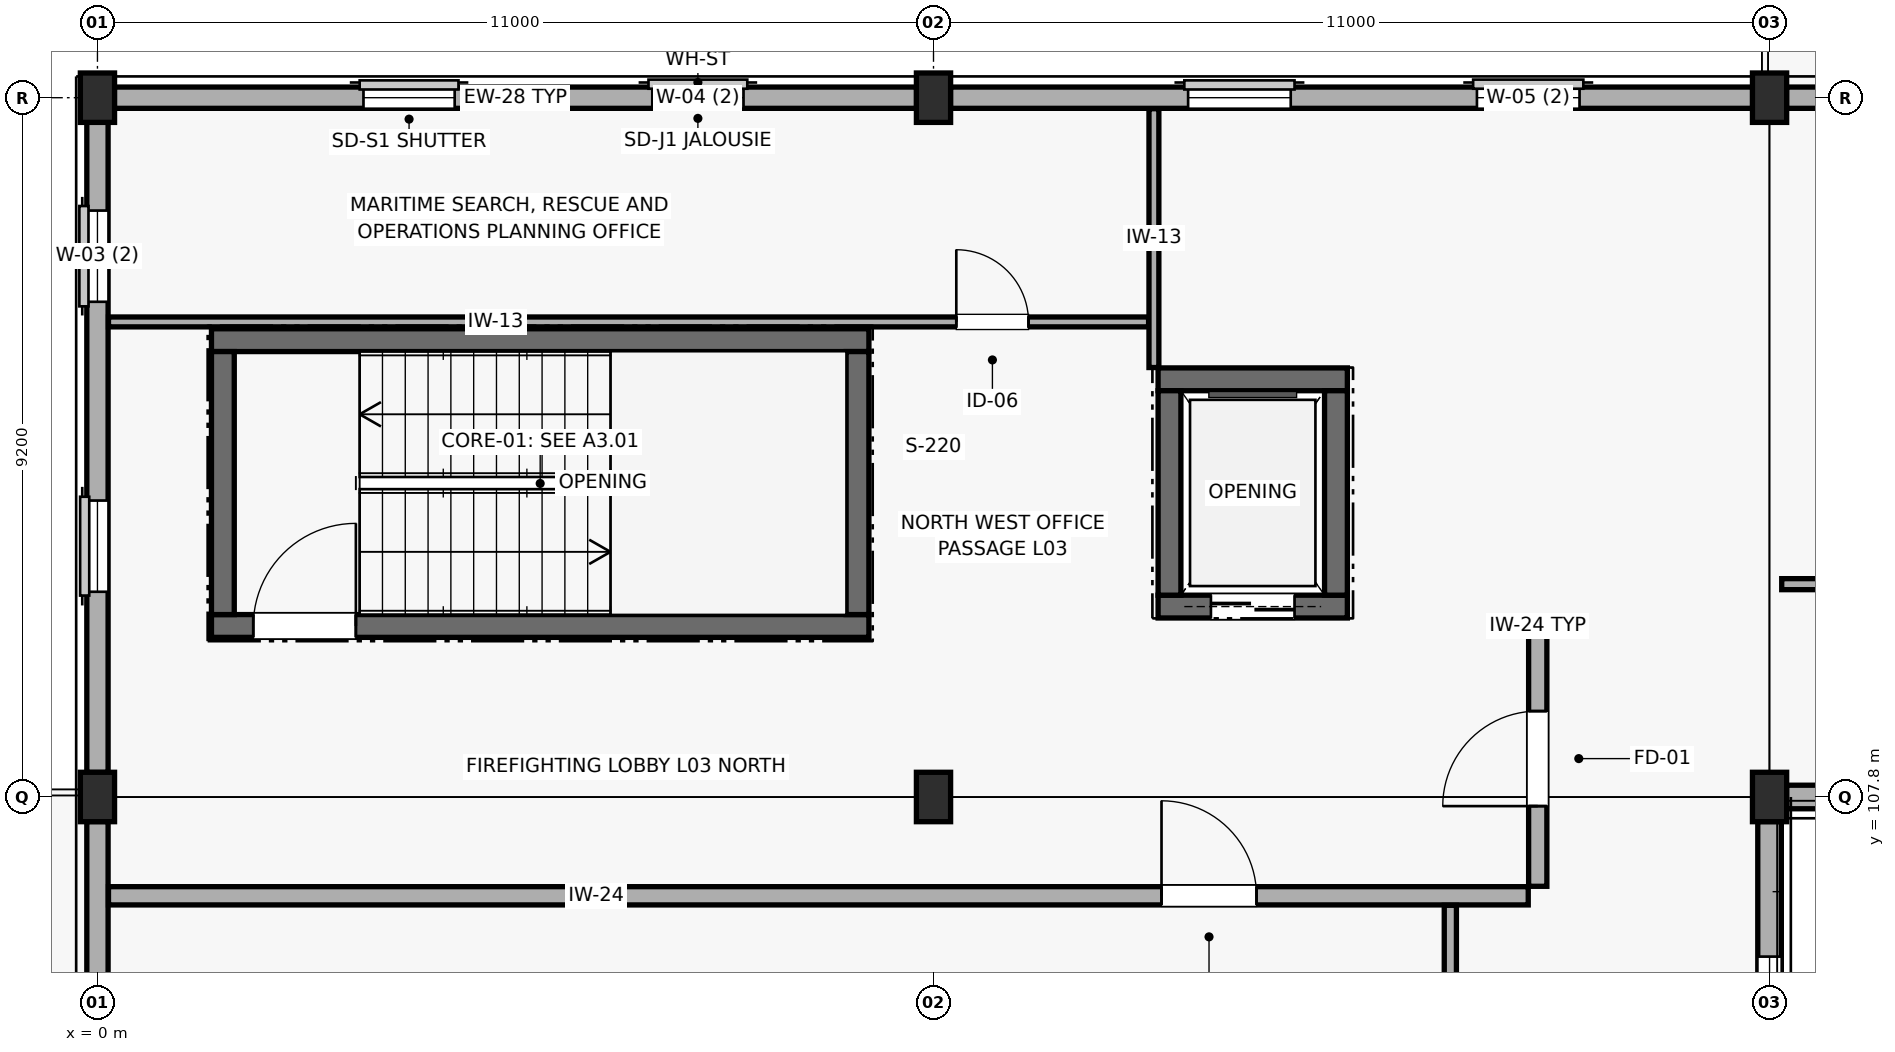
"""IFC4 building model, lengths in metres.
Left out: names, types, materials, properties, quantities, classifications, styles, units other than length and angle.
Written with IfcOpenShell. Run it as: python <this file> out.ifc"""

import sys

from ifc_helpers import new_model, si_unit, direction, frame, frame_2d, origin, origin_2d, place, context, subcontext, project, spatial, rectangle, extrude, element, fill, save


model = new_model("IFC4")
c1 = context("Model", 3, precision=1e-05, world=origin(), true_north=direction((0.0, 1.0)))
c2 = subcontext(c1, "Body", "Model", "MODEL_VIEW")
j1 = project(units=[si_unit("LENGTHUNIT", "METRE"), si_unit("PLANEANGLEUNIT", "RADIAN")], contexts=[c1])
p1 = place(None, origin())
s1 = spatial("IfcSite", under=j1, at=p1, CompositionType="ELEMENT")
p2 = place(p1, origin())
s2 = spatial("IfcBuilding", under=s1, at=p2, CompositionType="ELEMENT")
p3 = place(p2, frame((0.0, 0.0, 14.1)))
s3 = spatial("IfcBuildingStorey", under=s2, at=p3, CompositionType="ELEMENT", Elevation=14.1)
for number, where, z_axis, x_axis in (
    (1, (0.0, 107.8, 0.0), (0.0, 0.0, 1.0), (1.0, 0.0, 0.0)),
    (2, (0.0, 117.0, 0.0), (0.0, 0.0, 1.0), (1.0, 0.0, 0.0)),
    (3, (11.0, 107.8, 0.0), (0.0, 0.0, 1.0), (1.0, 0.0, 0.0)),
    (4, (11.0, 117.0, 0.0), (0.0, 0.0, 1.0), (1.0, 0.0, 0.0)),
    (5, (22.0, 107.8, 0.0), (0.0, 0.0, 1.0), (1.0, 0.0, 0.0)),
    (6, (22.0, 117.0, 0.0), (0.0, 0.0, 1.0), (1.0, 0.0, 0.0)),
):
    element("IfcColumn", number, at=place(p3, frame(where, z_axis=z_axis, x_axis=x_axis)), inside=s3, PredefinedType="COLUMN", context=c2, shape_type="SweptSolid", body=[
        extrude(rectangle(XDim=0.45, YDim=0.65, at=origin_2d()), origin(), (0.0, 0.0, 1.0), 4.2),
    ])
p4 = place(p3, frame((10.777, 117.0, 0.0), z_axis=(0.0, 0.0, 1.0), x_axis=(-1.0, 0.0, 0.0)))
e7 = element("IfcWall", 7, at=p4, inside=s3, PredefinedType="SOLIDWALL", context=c2, shape_type="SweptSolid", body=[
    extrude(rectangle(XDim=10.554, YDim=0.28, at=frame_2d((5.277, 0.0))), origin(), (0.0, 0.0, 1.0), 3.437),
])
p5 = place(p4, frame((2.277, 0.0, 0.95)))
e8 = element("IfcOpeningElement", 8, at=p5, cuts=e7, PredefinedType="OPENING", context=c2, shape_type="SweptSolid", body=[
    extrude(rectangle(XDim=1.2, YDim=2.1, at=frame_2d((0.6, 1.05))), frame((0.0, 0.15, 0.0), z_axis=(0.0, -1.0, 0.0), x_axis=(1.0, 0.0, 0.0)), (0.0, 0.0, 1.0), 0.3),
])
p6 = place(p4, frame((6.077, 0.0, 0.95)))
e9 = element("IfcOpeningElement", 9, at=p6, cuts=e7, PredefinedType="OPENING", context=c2, shape_type="SweptSolid", body=[
    extrude(rectangle(XDim=1.2, YDim=2.1, at=frame_2d((0.6, 1.05))), frame((0.0, 0.15, 0.0), z_axis=(0.0, -1.0, 0.0), x_axis=(1.0, 0.0, 0.0)), (0.0, 0.0, 1.0), 0.3),
])
p7 = place(p3, frame((21.777, 117.0, 0.0), z_axis=(0.0, 0.0, 1.0), x_axis=(-1.0, 0.0, 0.0)))
e10 = element("IfcWall", 10, at=p7, inside=s3, PredefinedType="SOLIDWALL", context=c2, shape_type="SweptSolid", body=[
    extrude(rectangle(XDim=10.554, YDim=0.28, at=frame_2d((5.277, 0.0))), origin(), (0.0, 0.0, 1.0), 3.437),
])
p8 = place(p7, frame((2.277, 0.0, 0.95)))
e11 = element("IfcOpeningElement", 11, at=p8, cuts=e10, PredefinedType="OPENING", context=c2, shape_type="SweptSolid", body=[
    extrude(rectangle(XDim=1.35, YDim=2.1, at=frame_2d((0.675, 1.05))), frame((0.0, 0.15, 0.0), z_axis=(0.0, -1.0, 0.0), x_axis=(1.0, 0.0, 0.0)), (0.0, 0.0, 1.0), 0.3),
])
p9 = place(p7, frame((6.077, 0.0, 0.95)))
e12 = element("IfcOpeningElement", 12, at=p9, cuts=e10, PredefinedType="OPENING", context=c2, shape_type="SweptSolid", body=[
    extrude(rectangle(XDim=1.35, YDim=2.1, at=frame_2d((0.675, 1.05))), frame((0.0, 0.15, 0.0), z_axis=(0.0, -1.0, 0.0), x_axis=(1.0, 0.0, 0.0)), (0.0, 0.0, 1.0), 0.3),
])
p10 = place(p3, frame((32.777, 117.0, 0.0), z_axis=(0.0, 0.0, 1.0), x_axis=(-1.0, 0.0, 0.0)))
e13 = element("IfcWall", 13, at=p10, inside=s3, PredefinedType="SOLIDWALL", context=c2, shape_type="SweptSolid", body=[
    extrude(rectangle(XDim=10.554, YDim=0.28, at=frame_2d((5.277, 0.0))), origin(), (0.0, 0.0, 1.0), 3.446),
])
p11 = place(p10, frame((4.877, 0.0, 0.0)))
e14 = element("IfcOpeningElement", 14, at=p11, cuts=e13, PredefinedType="OPENING", context=c2, shape_type="SweptSolid", body=[
    extrude(rectangle(XDim=1.2, YDim=2.2, at=frame_2d((0.6, 1.1))), frame((0.0, 0.15, 0.0), z_axis=(0.0, -1.0, 0.0), x_axis=(1.0, 0.0, 0.0)), (0.0, 0.0, 1.0), 0.3),
])
p12 = place(p3, frame((0.0, 107.477, 0.0), z_axis=(0.0, 0.0, 1.0), x_axis=(0.0, -1.0, 0.0)))
e15 = element("IfcWall", 15, at=p12, inside=s3, PredefinedType="SOLIDWALL", context=c2, shape_type="SweptSolid", body=[
    extrude(rectangle(XDim=8.554, YDim=0.28, at=frame_2d((4.277, 0.0))), origin(), (0.0, 0.0, 1.0), 3.439),
])
p13 = place(p12, frame((2.977, 0.0, 0.0)))
e16 = element("IfcOpeningElement", 16, at=p13, cuts=e15, PredefinedType="OPENING", context=c2, shape_type="SweptSolid", body=[
    extrude(rectangle(XDim=1.2, YDim=2.2, at=frame_2d((0.6, 1.1))), frame((0.0, 0.15, 0.0), z_axis=(0.0, -1.0, 0.0), x_axis=(1.0, 0.0, 0.0)), (0.0, 0.0, 1.0), 0.3),
])
p14 = place(p3, frame((0.0, 116.677, 0.0), z_axis=(0.0, 0.0, 1.0), x_axis=(0.0, -1.0, 0.0)))
e17 = element("IfcWall", 17, at=p14, inside=s3, PredefinedType="SOLIDWALL", context=c2, shape_type="SweptSolid", body=[
    extrude(rectangle(XDim=8.554, YDim=0.28, at=frame_2d((4.277, 0.0))), origin(), (0.0, 0.0, 1.0), 3.439),
])
p15 = place(p14, frame((1.162, 0.0, 0.95)))
e18 = element("IfcOpeningElement", 18, at=p15, cuts=e17, PredefinedType="OPENING", context=c2, shape_type="SweptSolid", body=[
    extrude(rectangle(XDim=1.2, YDim=1.8, at=frame_2d((0.6, 0.9))), frame((0.0, 0.15, 0.0), z_axis=(0.0, -1.0, 0.0), x_axis=(1.0, 0.0, 0.0)), (0.0, 0.0, 1.0), 0.3),
])
p16 = place(p14, frame((4.977, 0.0, 0.95)))
e19 = element("IfcOpeningElement", 19, at=p16, cuts=e17, PredefinedType="OPENING", context=c2, shape_type="SweptSolid", body=[
    extrude(rectangle(XDim=1.2, YDim=1.8, at=frame_2d((0.6, 0.9))), frame((0.0, 0.15, 0.0), z_axis=(0.0, -1.0, 0.0), x_axis=(1.0, 0.0, 0.0)), (0.0, 0.0, 1.0), 0.3),
])
p17 = place(p3, frame((22.223, 107.8, 0.0), z_axis=(0.0, 0.0, 1.0), x_axis=(1.0, 0.0, 0.0)))
e20 = element("IfcWall", 20, at=p17, inside=s3, PredefinedType="SOLIDWALL", context=c2, shape_type="SweptSolid", body=[
    extrude(rectangle(XDim=10.554, YDim=0.31, at=frame_2d((5.277, 0.0))), origin(), (0.0, 0.0, 1.0), 3.446),
])
p18 = place(p17, frame((2.477, 0.0, 0.95)))
e21 = element("IfcOpeningElement", 21, at=p18, cuts=e20, PredefinedType="OPENING", context=c2, shape_type="SweptSolid", body=[
    extrude(rectangle(XDim=1.65, YDim=2.25, at=frame_2d((0.825, 1.125))), frame((0.0, 0.165, 0.0), z_axis=(0.0, -1.0, 0.0), x_axis=(1.0, 0.0, 0.0)), (0.0, 0.0, 1.0), 0.33),
])
p19 = place(p17, frame((6.077, 0.0, 0.95)))
e22 = element("IfcOpeningElement", 22, at=p19, cuts=e20, PredefinedType="OPENING", context=c2, shape_type="SweptSolid", body=[
    extrude(rectangle(XDim=1.65, YDim=2.25, at=frame_2d((0.825, 1.125))), frame((0.0, 0.165, 0.0), z_axis=(0.0, -1.0, 0.0), x_axis=(1.0, 0.0, 0.0)), (0.0, 0.0, 1.0), 0.33),
])
p20 = place(p3, frame((22.0, 98.923, 0.0), z_axis=(0.0, 0.0, 1.0), x_axis=(0.0, 1.0, 0.0)))
e23 = element("IfcWall", 23, at=p20, inside=s3, PredefinedType="SOLIDWALL", context=c2, shape_type="SweptSolid", body=[
    extrude(rectangle(XDim=8.554, YDim=0.31, at=frame_2d((4.277, 0.0))), origin(), (0.0, 0.0, 1.0), 3.439),
])
p21 = place(p20, frame((2.177, 0.0, 0.95)))
e24 = element("IfcOpeningElement", 24, at=p21, cuts=e23, PredefinedType="OPENING", context=c2, shape_type="SweptSolid", body=[
    extrude(rectangle(XDim=1.5, YDim=2.25, at=frame_2d((0.75, 1.125))), frame((0.0, 0.165, 0.0), z_axis=(0.0, -1.0, 0.0), x_axis=(1.0, 0.0, 0.0)), (0.0, 0.0, 1.0), 0.33),
])
p22 = place(p20, frame((5.277, 0.0, 0.95)))
e25 = element("IfcOpeningElement", 25, at=p22, cuts=e23, PredefinedType="OPENING", context=c2, shape_type="SweptSolid", body=[
    extrude(rectangle(XDim=1.5, YDim=2.25, at=frame_2d((0.75, 1.125))), frame((0.0, 0.165, 0.0), z_axis=(0.0, -1.0, 0.0), x_axis=(1.0, 0.0, 0.0)), (0.0, 0.0, 1.0), 0.33),
])
p23 = place(p3, frame((1.5, 110.05, 0.0), z_axis=(0.0, 0.0, 1.0), x_axis=(1.0, 0.0, 0.0)))
e26 = element("IfcWall", 26, at=p23, inside=s3, PredefinedType="SHEAR", context=c2, shape_type="SweptSolid", body=[
    extrude(rectangle(XDim=8.65, YDim=0.3, at=frame_2d((4.325, 0.0))), origin(), (0.0, 0.0, 1.0), 3.98),
])
p24 = place(p23, frame((0.55, 0.0, 0.0)))
e27 = element("IfcOpeningElement", 27, at=p24, cuts=e26, PredefinedType="OPENING", context=c2, shape_type="SweptSolid", body=[
    extrude(rectangle(XDim=1.35, YDim=2.2, at=frame_2d((0.675, 1.1))), frame((0.0, 0.16, 0.0), z_axis=(0.0, -1.0, 0.0), x_axis=(1.0, 0.0, 0.0)), (0.0, 0.0, 1.0), 0.32),
])
p25 = place(p3, frame((10.15, 113.81, 0.0), z_axis=(0.0, 0.0, 1.0), x_axis=(-1.0, 0.0, 0.0)))
e28 = element("IfcWall", 28, at=p25, inside=s3, PredefinedType="SHEAR", context=c2, shape_type="SweptSolid", body=[
    extrude(rectangle(XDim=8.65, YDim=0.3, at=frame_2d((4.325, 0.0))), origin(), (0.0, 0.0, 1.0), 3.98),
])
for number, where, z_axis, x_axis in (
    (29, (1.65, 113.66, 0.0), (0.0, 0.0, 1.0), (0.0, -1.0, 0.0)),
    (30, (10.0, 110.2, 0.0), (0.0, 0.0, 1.0), (0.0, 1.0, 0.0)),
):
    element("IfcWall", number, at=place(p3, frame(where, z_axis=z_axis, x_axis=x_axis)), inside=s3, PredefinedType="SHEAR", context=c2, shape_type="SweptSolid", body=[
        extrude(rectangle(XDim=3.46, YDim=0.3, at=frame_2d((1.73, 0.0))), origin(), (0.0, 0.0, 1.0), 3.98),
    ])
p26 = place(p3, frame((13.955, 110.305, 0.0), z_axis=(0.0, 0.0, 1.0), x_axis=(1.0, 0.0, 0.0)))
e31 = element("IfcWall", 31, at=p26, inside=s3, PredefinedType="SHEAR", context=c2, shape_type="SweptSolid", body=[
    extrude(rectangle(XDim=2.49, YDim=0.3, at=frame_2d((1.245, 0.0))), origin(), (0.0, 0.0, 1.0), 3.98),
])
p27 = place(p26, frame((0.695, 0.0, 0.0)))
e32 = element("IfcOpeningElement", 32, at=p27, cuts=e31, PredefinedType="OPENING", context=c2, shape_type="SweptSolid", body=[
    extrude(rectangle(XDim=1.1, YDim=2.15, at=frame_2d((0.55, 1.075))), frame((0.0, 0.16, 0.0), z_axis=(0.0, -1.0, 0.0), x_axis=(1.0, 0.0, 0.0)), (0.0, 0.0, 1.0), 0.32),
])
p28 = place(p3, frame((16.445, 113.295, 0.0), z_axis=(0.0, 0.0, 1.0), x_axis=(-1.0, 0.0, 0.0)))
e33 = element("IfcWall", 33, at=p28, inside=s3, PredefinedType="SHEAR", context=c2, shape_type="SweptSolid", body=[
    extrude(rectangle(XDim=2.49, YDim=0.3, at=frame_2d((1.245, 0.0))), origin(), (0.0, 0.0, 1.0), 3.98),
])
for number, where, z_axis, x_axis in (
    (34, (14.105, 113.145, 0.0), (0.0, 0.0, 1.0), (0.0, -1.0, 0.0)),
    (35, (16.295, 110.455, 0.0), (0.0, 0.0, 1.0), (0.0, 1.0, 0.0)),
):
    element("IfcWall", number, at=place(p3, frame(where, z_axis=z_axis, x_axis=x_axis)), inside=s3, PredefinedType="SHEAR", context=c2, shape_type="SweptSolid", body=[
        extrude(rectangle(XDim=2.69, YDim=0.3, at=frame_2d((1.345, 0.0))), origin(), (0.0, 0.0, 1.0), 3.98),
    ])
p29 = place(p3, frame((0.145, 106.5, 0.0), z_axis=(0.0, 0.0, 1.0), x_axis=(1.0, 0.0, 0.0)))
e36 = element("IfcWall", 36, at=p29, inside=s3, PredefinedType="PARTITIONING", context=c2, shape_type="SweptSolid", body=[
    extrude(rectangle(XDim=18.68, YDim=0.24, at=frame_2d((9.34, 0.0))), origin(), (0.0, 0.0, 1.0), 3.439),
])
p30 = place(p29, frame((13.855, 0.0, 0.0)))
e37 = element("IfcOpeningElement", 37, at=p30, cuts=e36, PredefinedType="OPENING", context=c2, shape_type="SweptSolid", body=[
    extrude(rectangle(XDim=1.25, YDim=2.2, at=frame_2d((0.625, 1.1))), frame((0.0, 0.13, 0.0), z_axis=(0.0, -1.0, 0.0), x_axis=(1.0, 0.0, 0.0)), (0.0, 0.0, 1.0), 0.26),
])
p31 = place(p3, frame((17.8, 80.625, 0.0), z_axis=(0.0, 0.0, 1.0), x_axis=(0.0, 1.0, 0.0)))
e38 = element("IfcWall", 38, at=p31, inside=s3, PredefinedType="PARTITIONING", context=c2, shape_type="SweptSolid", body=[
    extrude(rectangle(XDim=25.75, YDim=0.16, at=frame_2d((12.875, 0.0))), origin(), (0.0, 0.0, 1.0), 3.437),
])
p32 = place(p31, frame((5.205, 0.0, 0.0)))
e39 = element("IfcOpeningElement", 39, at=p32, cuts=e38, PredefinedType="OPENING", context=c2, shape_type="SweptSolid", body=[
    extrude(rectangle(XDim=1.05, YDim=2.2, at=frame_2d((0.525, 1.1))), frame((0.0, 0.09, 0.0), z_axis=(0.0, -1.0, 0.0), x_axis=(1.0, 0.0, 0.0)), (0.0, 0.0, 1.0), 0.18),
])
p33 = place(p31, frame((18.205, 0.0, 0.0)))
e40 = element("IfcOpeningElement", 40, at=p33, cuts=e38, PredefinedType="OPENING", context=c2, shape_type="SweptSolid", body=[
    extrude(rectangle(XDim=1.05, YDim=2.2, at=frame_2d((0.525, 1.1))), frame((0.0, 0.09, 0.0), z_axis=(0.0, -1.0, 0.0), x_axis=(1.0, 0.0, 0.0)), (0.0, 0.0, 1.0), 0.18),
])
p34 = place(p3, frame((18.95, 106.625, 0.0), z_axis=(0.0, 0.0, 1.0), x_axis=(0.0, 1.0, 0.0)))
e41 = element("IfcWall", 41, at=p34, inside=s3, PredefinedType="PARTITIONING", context=c2, shape_type="SweptSolid", body=[
    extrude(rectangle(XDim=3.525, YDim=0.24, at=frame_2d((1.762, 0.0))), origin(), (0.0, 0.0, 1.0), 3.437),
])
p35 = place(p34, frame((1.055, 0.0, 0.0)))
e42 = element("IfcOpeningElement", 42, at=p35, cuts=e41, PredefinedType="OPENING", context=c2, shape_type="SweptSolid", body=[
    extrude(rectangle(XDim=1.25, YDim=2.2, at=frame_2d((0.625, 1.1))), frame((0.0, 0.13, 0.0), z_axis=(0.0, -1.0, 0.0), x_axis=(1.0, 0.0, 0.0)), (0.0, 0.0, 1.0), 0.26),
])
p36 = place(p3, frame((0.145, 114.05, 0.0), z_axis=(0.0, 0.0, 1.0), x_axis=(1.0, 0.0, 0.0)))
e43 = element("IfcWall", 43, at=p36, inside=s3, PredefinedType="PARTITIONING", context=c2, shape_type="SweptSolid", body=[
    extrude(rectangle(XDim=13.685, YDim=0.13, at=frame_2d((6.843, 0.0))), origin(), (0.0, 0.0, 1.0), 3.439),
])
p37 = place(p36, frame((11.155, 0.0, 0.0)))
e44 = element("IfcOpeningElement", 44, at=p37, cuts=e43, PredefinedType="OPENING", context=c2, shape_type="SweptSolid", body=[
    extrude(rectangle(XDim=0.95, YDim=2.15, at=frame_2d((0.475, 1.075))), frame((0.0, 0.075, 0.0), z_axis=(0.0, -1.0, 0.0), x_axis=(1.0, 0.0, 0.0)), (0.0, 0.0, 1.0), 0.15),
])
p38 = place(p3, frame((13.9, 113.45, 0.0), z_axis=(0.0, 0.0, 1.0), x_axis=(0.0, 1.0, 0.0)))
e45 = element("IfcWall", 45, at=p38, inside=s3, PredefinedType="PARTITIONING", context=c2, shape_type="SweptSolid", body=[
    extrude(rectangle(XDim=3.405, YDim=0.13, at=frame_2d((1.703, 0.0))), origin(), (0.0, 0.0, 1.0), 3.667),
])
p39 = place(p3, frame((22.16, 110.6, 0.0), z_axis=(0.0, 0.0, 1.0), x_axis=(1.0, 0.0, 0.0)))
e46 = element("IfcWall", 46, at=p39, inside=s3, PredefinedType="PARTITIONING", context=c2, shape_type="SweptSolid", body=[
    extrude(rectangle(XDim=43.695, YDim=0.145, at=frame_2d((21.848, 0.0))), origin(), (0.0, 0.0, 1.0), 3.449),
])
p40 = place(p39, frame((9.5, 0.0, 0.0)))
e47 = element("IfcOpeningElement", 47, at=p40, cuts=e46, PredefinedType="OPENING", context=c2, shape_type="SweptSolid", body=[
    extrude(rectangle(XDim=1.0, YDim=2.15, at=frame_2d((0.5, 1.075))), frame((0.0, 0.083, 0.0), z_axis=(0.0, -1.0, 0.0), x_axis=(1.0, 0.0, 0.0)), (0.0, 0.0, 1.0), 0.165),
])
p41 = place(p39, frame((31.5, 0.0, 0.0)))
e48 = element("IfcOpeningElement", 48, at=p41, cuts=e46, PredefinedType="OPENING", context=c2, shape_type="SweptSolid", body=[
    extrude(rectangle(XDim=1.05, YDim=2.2, at=frame_2d((0.525, 1.1))), frame((0.0, 0.083, 0.0), z_axis=(0.0, -1.0, 0.0), x_axis=(1.0, 0.0, 0.0)), (0.0, 0.0, 1.0), 0.165),
])
p42 = place(p5, origin())
e49 = element("IfcWindow", 49, at=p42, inside=s3, PartitioningType="SINGLE_PANEL", PredefinedType="WINDOW", context=c2, shape_type="SweptSolid", body=[
    extrude(rectangle(XDim=1.2, YDim=2.1, at=frame_2d((0.6, 1.05))), frame((0.0, 0.03, 0.0), z_axis=(0.0, -1.0, 0.0), x_axis=(1.0, 0.0, 0.0)), (0.0, 0.0, 1.0), 0.06),
])
fill(e8, e49)
p43 = place(p6, origin())
e50 = element("IfcWindow", 50, at=p43, inside=s3, PartitioningType="SINGLE_PANEL", PredefinedType="WINDOW", context=c2, shape_type="SweptSolid", body=[
    extrude(rectangle(XDim=1.2, YDim=2.1, at=frame_2d((0.6, 1.05))), frame((0.0, 0.03, 0.0), z_axis=(0.0, -1.0, 0.0), x_axis=(1.0, 0.0, 0.0)), (0.0, 0.0, 1.0), 0.06),
])
fill(e9, e50)
p44 = place(p8, origin())
e51 = element("IfcWindow", 51, at=p44, inside=s3, PartitioningType="SINGLE_PANEL", PredefinedType="WINDOW", context=c2, shape_type="SweptSolid", body=[
    extrude(rectangle(XDim=1.35, YDim=2.1, at=frame_2d((0.675, 1.05))), frame((0.0, 0.03, 0.0), z_axis=(0.0, -1.0, 0.0), x_axis=(1.0, 0.0, 0.0)), (0.0, 0.0, 1.0), 0.06),
])
fill(e11, e51)
p45 = place(p9, origin())
e52 = element("IfcWindow", 52, at=p45, inside=s3, PartitioningType="SINGLE_PANEL", PredefinedType="WINDOW", context=c2, shape_type="SweptSolid", body=[
    extrude(rectangle(XDim=1.35, YDim=2.1, at=frame_2d((0.675, 1.05))), frame((0.0, 0.03, 0.0), z_axis=(0.0, -1.0, 0.0), x_axis=(1.0, 0.0, 0.0)), (0.0, 0.0, 1.0), 0.06),
])
fill(e12, e52)
p46 = place(p15, origin())
e53 = element("IfcWindow", 53, at=p46, inside=s3, PartitioningType="SINGLE_PANEL", PredefinedType="WINDOW", context=c2, shape_type="SweptSolid", body=[
    extrude(rectangle(XDim=1.2, YDim=1.8, at=frame_2d((0.6, 0.9))), frame((0.0, 0.03, 0.0), z_axis=(0.0, -1.0, 0.0), x_axis=(1.0, 0.0, 0.0)), (0.0, 0.0, 1.0), 0.06),
])
fill(e18, e53)
p47 = place(p16, origin())
e54 = element("IfcWindow", 54, at=p47, inside=s3, PartitioningType="SINGLE_PANEL", PredefinedType="WINDOW", context=c2, shape_type="SweptSolid", body=[
    extrude(rectangle(XDim=1.2, YDim=1.8, at=frame_2d((0.6, 0.9))), frame((0.0, 0.03, 0.0), z_axis=(0.0, -1.0, 0.0), x_axis=(1.0, 0.0, 0.0)), (0.0, 0.0, 1.0), 0.06),
])
fill(e19, e54)
p48 = place(p22, origin())
e55 = element("IfcWindow", 55, at=p48, inside=s3, PartitioningType="SINGLE_PANEL", PredefinedType="WINDOW", context=c2, shape_type="SweptSolid", body=[
    extrude(rectangle(XDim=1.5, YDim=2.25, at=frame_2d((0.75, 1.125))), frame((0.0, 0.03, 0.0), z_axis=(0.0, -1.0, 0.0), x_axis=(1.0, 0.0, 0.0)), (0.0, 0.0, 1.0), 0.06),
])
fill(e25, e55)
p49 = place(p24, origin())
e56 = element("IfcDoor", 56, at=p49, inside=s3, OperationType="SINGLE_SWING_RIGHT", PredefinedType="DOOR", context=c2, shape_type="SweptSolid", body=[
    extrude(rectangle(XDim=1.35, YDim=2.2, at=frame_2d((0.675, 1.1))), frame((0.0, 0.025, 0.0), z_axis=(0.0, -1.0, 0.0), x_axis=(1.0, 0.0, 0.0)), (0.0, 0.0, 1.0), 0.05),
])
fill(e27, e56)
p50 = place(p27, frame((1.1, 0.0, 0.0), z_axis=(0.0, 0.0, 1.0), x_axis=(-1.0, 0.0, 0.0)))
e57 = element("IfcDoor", 57, at=p50, inside=s3, OperationType="DOUBLE_DOOR_SLIDING", PredefinedType="DOOR", context=c2, shape_type="SweptSolid", body=[
    extrude(rectangle(XDim=1.1, YDim=2.15, at=frame_2d((0.55, 1.075))), frame((0.0, 0.025, 0.0), z_axis=(0.0, -1.0, 0.0), x_axis=(1.0, 0.0, 0.0)), (0.0, 0.0, 1.0), 0.05),
])
fill(e32, e57)
p51 = place(p30, origin())
e58 = element("IfcDoor", 58, at=p51, inside=s3, OperationType="SINGLE_SWING_LEFT", PredefinedType="DOOR", context=c2, shape_type="SweptSolid", body=[
    extrude(rectangle(XDim=1.25, YDim=2.2, at=frame_2d((0.625, 1.1))), frame((0.0, 0.025, 0.0), z_axis=(0.0, -1.0, 0.0), x_axis=(1.0, 0.0, 0.0)), (0.0, 0.0, 1.0), 0.05),
])
fill(e37, e58)
p52 = place(p35, origin())
e59 = element("IfcDoor", 59, at=p52, inside=s3, OperationType="SINGLE_SWING_LEFT", PredefinedType="DOOR", context=c2, shape_type="SweptSolid", body=[
    extrude(rectangle(XDim=1.25, YDim=2.2, at=frame_2d((0.625, 1.1))), frame((0.0, 0.025, 0.0), z_axis=(0.0, -1.0, 0.0), x_axis=(1.0, 0.0, 0.0)), (0.0, 0.0, 1.0), 0.05),
])
fill(e42, e59)
p53 = place(p37, origin())
e60 = element("IfcDoor", 60, at=p53, inside=s3, OperationType="SINGLE_SWING_LEFT", PredefinedType="DOOR", context=c2, shape_type="SweptSolid", body=[
    extrude(rectangle(XDim=0.95, YDim=2.15, at=frame_2d((0.475, 1.075))), frame((0.0, 0.025, 0.0), z_axis=(0.0, -1.0, 0.0), x_axis=(1.0, 0.0, 0.0)), (0.0, 0.0, 1.0), 0.05),
])
fill(e44, e60)
save(model, sys.argv[1])
